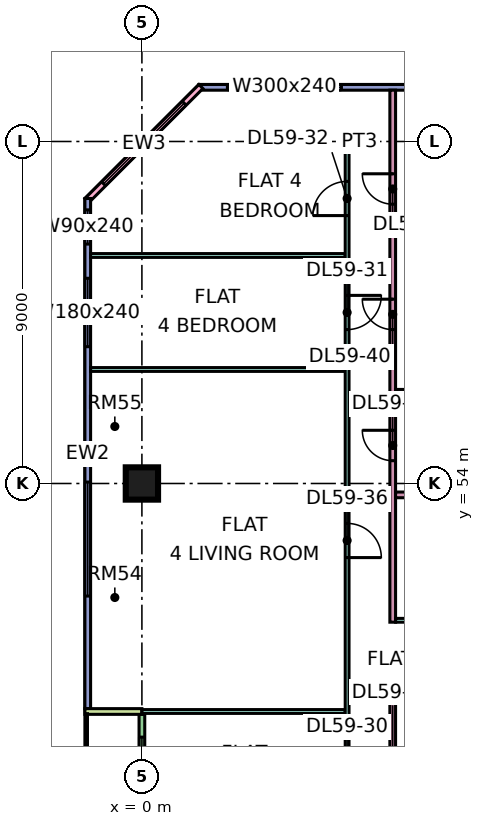
"""IFC4 building model, lengths in metres.
Left out: names, types, materials, properties, quantities, classifications, styles, units other than length and angle.
Written with IfcOpenShell. Run it as: python <this file> out.ifc"""

import sys

from ifc_helpers import new_model, si_unit, direction, frame, frame_2d, origin, origin_2d, place, context, subcontext, project, spatial, rectangle, extrude, element, fill, save


model = new_model("IFC4")
c1 = context("Model", 3, precision=1e-05, world=origin(), true_north=direction((0.0, 1.0)))
c2 = subcontext(c1, "Body", "Model", "MODEL_VIEW")
j1 = project(units=[si_unit("LENGTHUNIT", "METRE"), si_unit("PLANEANGLEUNIT", "RADIAN")], contexts=[c1])
p1 = place(None, origin())
s1 = spatial("IfcSite", under=j1, at=p1, CompositionType="ELEMENT")
p2 = place(p1, origin())
s2 = spatial("IfcBuilding", under=s1, at=p2, CompositionType="ELEMENT")
p3 = place(p2, frame((0.0, 0.0, 249.15)))
s3 = spatial("IfcBuildingStorey", under=s2, at=p3, CompositionType="ELEMENT", Elevation=249.15)
p4 = place(p3, frame((0.0, 54.0, 0.0), z_axis=(0.0, 0.0, 1.0), x_axis=(1.0, 0.0, 0.0)))
e1 = element("IfcColumn", 1, at=p4, inside=s3, PredefinedType="COLUMN", context=c2, shape_type="SweptSolid", body=[
    extrude(rectangle(XDim=0.85, YDim=0.85, at=origin_2d()), origin(), (0.0, 0.0, 1.0), 3.75),
])
p5 = place(p3, frame((11.925, 64.425, 0.0), z_axis=(0.0, 0.0, 1.0), x_axis=(-1.0, 0.0, 0.0)))
e2 = element("IfcWall", 2, at=p5, inside=s3, PredefinedType="SOLIDWALL", context=c2, shape_type="SweptSolid", body=[
    extrude(rectangle(XDim=10.425, YDim=0.15, at=frame_2d((5.212, 0.0))), origin(), (0.0, 0.0, 1.0), 3.35),
])
p6 = place(p5, frame((6.675, 0.0, 0.45)))
e3 = element("IfcOpeningElement", 3, at=p6, cuts=e2, PredefinedType="OPENING", context=c2, shape_type="SweptSolid", body=[
    extrude(rectangle(XDim=3.0, YDim=2.4, at=frame_2d((1.5, 1.2))), frame((0.0, 0.085, 0.0), z_axis=(0.0, -1.0, 0.0), x_axis=(1.0, 0.0, 0.0)), (0.0, 0.0, 1.0), 0.17),
])
p7 = place(p3, frame((1.553, 64.447, 0.0), z_axis=(0.0, 0.0, 1.0), x_axis=(-0.707106781187, -0.707106781187, 0.0)))
e4 = element("IfcWall", 4, at=p7, inside=s3, PredefinedType="SOLIDWALL", context=c2, shape_type="SweptSolid", body=[
    extrude(rectangle(XDim=4.243, YDim=0.15, at=frame_2d((2.121, 0.0))), origin(), (0.0, 0.0, 1.0), 3.35),
])
p8 = place(p7, frame((0.621, 0.0, 0.45)))
e5 = element("IfcOpeningElement", 5, at=p8, cuts=e4, PredefinedType="OPENING", context=c2, shape_type="SweptSolid", body=[
    extrude(rectangle(XDim=3.0, YDim=2.4, at=frame_2d((1.5, 1.2))), frame((0.0, 0.085, 0.0), z_axis=(0.0, -1.0, 0.0), x_axis=(1.0, 0.0, 0.0)), (0.0, 0.0, 1.0), 0.17),
])
p9 = place(p3, frame((-1.425, 61.5, 0.0), z_axis=(0.0, 0.0, 1.0), x_axis=(0.0, -1.0, 0.0)))
e6 = element("IfcWall", 6, at=p9, inside=s3, PredefinedType="SOLIDWALL", context=c2, shape_type="SweptSolid", body=[
    extrude(rectangle(XDim=13.425, YDim=0.15, at=frame_2d((6.712, 0.0))), origin(), (0.0, 0.0, 1.0), 3.35),
])
p10 = place(p9, frame((0.3, 0.0, 0.45)))
e7 = element("IfcOpeningElement", 7, at=p10, cuts=e6, PredefinedType="OPENING", context=c2, shape_type="SweptSolid", body=[
    extrude(rectangle(XDim=0.9, YDim=2.4, at=frame_2d((0.45, 1.2))), frame((0.0, 0.085, 0.0), z_axis=(0.0, -1.0, 0.0), x_axis=(1.0, 0.0, 0.0)), (0.0, 0.0, 1.0), 0.17),
])
p11 = place(p9, frame((2.1, 0.0, 0.45)))
e8 = element("IfcOpeningElement", 8, at=p11, cuts=e6, PredefinedType="OPENING", context=c2, shape_type="SweptSolid", body=[
    extrude(rectangle(XDim=1.8, YDim=2.4, at=frame_2d((0.9, 1.2))), frame((0.0, 0.085, 0.0), z_axis=(0.0, -1.0, 0.0), x_axis=(1.0, 0.0, 0.0)), (0.0, 0.0, 1.0), 0.17),
])
p12 = place(p9, frame((7.462, 0.0, 0.45)))
e9 = element("IfcOpeningElement", 9, at=p12, cuts=e6, PredefinedType="OPENING", context=c2, shape_type="SweptSolid", body=[
    extrude(rectangle(XDim=3.0, YDim=2.4, at=frame_2d((1.5, 1.2))), frame((0.0, 0.085, 0.0), z_axis=(0.0, -1.0, 0.0), x_axis=(1.0, 0.0, 0.0)), (0.0, 0.0, 1.0), 0.17),
])
p13 = place(p3, frame((0.0, 47.925, 0.0), z_axis=(0.0, 0.0, 1.0), x_axis=(0.0, -1.0, 0.0)))
e10 = element("IfcWall", 10, at=p13, inside=s3, PredefinedType="SOLIDWALL", context=c2, shape_type="SweptSolid", body=[
    extrude(rectangle(XDim=11.85, YDim=0.15, at=frame_2d((5.925, 0.0))), origin(), (0.0, 0.0, 1.0), 3.35),
])
p14 = place(p13, frame((0.6, 0.0, 0.45)))
e11 = element("IfcOpeningElement", 11, at=p14, cuts=e10, PredefinedType="OPENING", context=c2, shape_type="SweptSolid", body=[
    extrude(rectangle(XDim=1.2, YDim=2.4, at=frame_2d((0.6, 1.2))), frame((0.0, 0.085, 0.0), z_axis=(0.0, -1.0, 0.0), x_axis=(1.0, 0.0, 0.0)), (0.0, 0.0, 1.0), 0.17),
])
p15 = place(p13, frame((4.087, 0.0, 0.0)))
e12 = element("IfcOpeningElement", 12, at=p15, cuts=e10, PredefinedType="OPENING", context=c2, shape_type="SweptSolid", body=[
    extrude(rectangle(XDim=1.2, YDim=2.4, at=frame_2d((0.6, 1.2))), frame((0.0, 0.085, 0.0), z_axis=(0.0, -1.0, 0.0), x_axis=(1.0, 0.0, 0.0)), (0.0, 0.0, 1.0), 0.17),
])
p16 = place(p13, frame((6.525, 0.0, 0.45)))
e13 = element("IfcOpeningElement", 13, at=p16, cuts=e10, PredefinedType="OPENING", context=c2, shape_type="SweptSolid", body=[
    extrude(rectangle(XDim=1.8, YDim=2.4, at=frame_2d((0.9, 1.2))), frame((0.0, 0.085, 0.0), z_axis=(0.0, -1.0, 0.0), x_axis=(1.0, 0.0, 0.0)), (0.0, 0.0, 1.0), 0.17),
])
p17 = place(p13, frame((9.562, 0.0, 0.45)))
e14 = element("IfcOpeningElement", 14, at=p17, cuts=e10, PredefinedType="OPENING", context=c2, shape_type="SweptSolid", body=[
    extrude(rectangle(XDim=1.2, YDim=2.4, at=frame_2d((0.6, 1.2))), frame((0.0, 0.085, 0.0), z_axis=(0.0, -1.0, 0.0), x_axis=(1.0, 0.0, 0.0)), (0.0, 0.0, 1.0), 0.17),
])
p18 = place(p3, frame((-1.5, 48.0, 0.0), z_axis=(0.0, 0.0, 1.0), x_axis=(1.0, 0.0, 0.0)))
e15 = element("IfcWall", 15, at=p18, inside=s3, PredefinedType="SOLIDWALL", context=c2, shape_type="SweptSolid", body=[
    extrude(rectangle(XDim=1.5, YDim=0.15, at=frame_2d((0.75, 0.0))), origin(), (0.0, 0.0, 1.0), 3.35),
])
p19 = place(p3, frame((-1.351, 60.0, 0.0), z_axis=(0.0, 0.0, 1.0), x_axis=(1.0, 0.0, 0.0)))
e16 = element("IfcWall", 16, at=p19, inside=s3, PredefinedType="PARTITIONING", context=c2, shape_type="SweptSolid", body=[
    extrude(rectangle(XDim=6.701, YDim=0.1, at=frame_2d((3.351, 0.0))), origin(), (0.0, 0.0, 1.0), 3.35),
])
p20 = place(p3, frame((0.0, 48.0, 0.0), z_axis=(0.0, 0.0, 1.0), x_axis=(1.0, 0.0, 0.0)))
e17 = element("IfcWall", 17, at=p20, inside=s3, PredefinedType="PARTITIONING", context=c2, shape_type="SweptSolid", body=[
    extrude(rectangle(XDim=5.35, YDim=0.1, at=frame_2d((2.675, 0.0))), origin(), (0.0, 0.0, 1.0), 3.35),
])
p21 = place(p3, frame((-1.35, 57.0, 0.0), z_axis=(0.0, 0.0, 1.0), x_axis=(1.0, 0.0, 0.0)))
e18 = element("IfcWall", 18, at=p21, inside=s3, PredefinedType="PARTITIONING", context=c2, shape_type="SweptSolid", body=[
    extrude(rectangle(XDim=6.7, YDim=0.1, at=frame_2d((3.35, 0.0))), origin(), (0.0, 0.0, 1.0), 3.35),
])
p22 = place(p3, frame((5.4, 36.1, 0.0), z_axis=(0.0, 0.0, 1.0), x_axis=(0.0, 1.0, 0.0)))
e19 = element("IfcWall", 19, at=p22, inside=s3, PredefinedType="PARTITIONING", context=c2, shape_type="SweptSolid", body=[
    extrude(rectangle(XDim=26.95, YDim=0.1, at=frame_2d((13.475, 0.0))), origin(), (0.0, 0.0, 1.0), 3.35),
])
p23 = place(p22, frame((0.95, 0.0, 0.0)))
e20 = element("IfcOpeningElement", 20, at=p23, cuts=e19, PredefinedType="OPENING", context=c2, shape_type="SweptSolid", body=[
    extrude(rectangle(XDim=0.9, YDim=2.1, at=frame_2d((0.45, 1.05))), frame((0.0, 0.06, 0.0), z_axis=(0.0, -1.0, 0.0), x_axis=(1.0, 0.0, 0.0)), (0.0, 0.0, 1.0), 0.12),
])
p24 = place(p22, frame((3.95, 0.0, 0.0)))
e21 = element("IfcOpeningElement", 21, at=p24, cuts=e19, PredefinedType="OPENING", context=c2, shape_type="SweptSolid", body=[
    extrude(rectangle(XDim=0.9, YDim=2.1, at=frame_2d((0.45, 1.05))), frame((0.0, 0.06, 0.0), z_axis=(0.0, -1.0, 0.0), x_axis=(1.0, 0.0, 0.0)), (0.0, 0.0, 1.0), 0.12),
])
p25 = place(p22, frame((6.95, 0.0, 0.0)))
e22 = element("IfcOpeningElement", 22, at=p25, cuts=e19, PredefinedType="OPENING", context=c2, shape_type="SweptSolid", body=[
    extrude(rectangle(XDim=0.9, YDim=2.1, at=frame_2d((0.45, 1.05))), frame((0.0, 0.06, 0.0), z_axis=(0.0, -1.0, 0.0), x_axis=(1.0, 0.0, 0.0)), (0.0, 0.0, 1.0), 0.12),
])
p26 = place(p22, frame((9.95, 0.0, 0.0)))
e23 = element("IfcOpeningElement", 23, at=p26, cuts=e19, PredefinedType="OPENING", context=c2, shape_type="SweptSolid", body=[
    extrude(rectangle(XDim=0.9, YDim=2.1, at=frame_2d((0.45, 1.05))), frame((0.0, 0.06, 0.0), z_axis=(0.0, -1.0, 0.0), x_axis=(1.0, 0.0, 0.0)), (0.0, 0.0, 1.0), 0.12),
])
p27 = place(p22, frame((21.95, 0.0, 0.0)))
e24 = element("IfcOpeningElement", 24, at=p27, cuts=e19, PredefinedType="OPENING", context=c2, shape_type="SweptSolid", body=[
    extrude(rectangle(XDim=0.9, YDim=2.1, at=frame_2d((0.45, 1.05))), frame((0.0, 0.06, 0.0), z_axis=(0.0, -1.0, 0.0), x_axis=(1.0, 0.0, 0.0)), (0.0, 0.0, 1.0), 0.12),
])
p28 = place(p22, frame((24.95, 0.0, 0.0)))
e25 = element("IfcOpeningElement", 25, at=p28, cuts=e19, PredefinedType="OPENING", context=c2, shape_type="SweptSolid", body=[
    extrude(rectangle(XDim=0.9, YDim=2.1, at=frame_2d((0.45, 1.05))), frame((0.0, 0.06, 0.0), z_axis=(0.0, -1.0, 0.0), x_axis=(1.0, 0.0, 0.0)), (0.0, 0.0, 1.0), 0.12),
])
p29 = place(p22, frame((15.95, 0.0, 0.0)))
e26 = element("IfcOpeningElement", 26, at=p29, cuts=e19, PredefinedType="OPENING", context=c2, shape_type="SweptSolid", body=[
    extrude(rectangle(XDim=0.9, YDim=2.1, at=frame_2d((0.45, 1.05))), frame((0.0, 0.06, 0.0), z_axis=(0.0, -1.0, 0.0), x_axis=(1.0, 0.0, 0.0)), (0.0, 0.0, 1.0), 0.12),
])
p30 = place(p3, frame((5.45, 63.0, 0.0), z_axis=(0.0, 0.0, 1.0), x_axis=(1.0, 0.0, 0.0)))
e27 = element("IfcWall", 27, at=p30, inside=s3, PredefinedType="PARTITIONING", context=c2, shape_type="SweptSolid", body=[
    extrude(rectangle(XDim=0.55, YDim=0.1, at=frame_2d((0.275, 0.0))), origin(), (0.0, 0.0, 1.0), 3.35),
])
p31 = place(p3, frame((6.6, 36.1, 0.0), z_axis=(0.0, 0.0, 1.0), x_axis=(0.0, 1.0, 0.0)))
e28 = element("IfcWall", 28, at=p31, inside=s3, PredefinedType="PARTITIONING", context=c2, shape_type="SweptSolid", body=[
    extrude(rectangle(XDim=12.275, YDim=0.15, at=frame_2d((6.137, 0.0))), origin(), (0.0, 0.0, 1.0), 3.35),
])
p32 = place(p31, frame((6.95, 0.0, 0.0)))
e29 = element("IfcOpeningElement", 29, at=p32, cuts=e28, PredefinedType="OPENING", context=c2, shape_type="SweptSolid", body=[
    extrude(rectangle(XDim=0.8, YDim=2.1, at=frame_2d((0.4, 1.05))), frame((0.0, 0.085, 0.0), z_axis=(0.0, -1.0, 0.0), x_axis=(1.0, 0.0, 0.0)), (0.0, 0.0, 1.0), 0.17),
])
p33 = place(p31, frame((2.75, 0.0, 0.0)))
e30 = element("IfcOpeningElement", 30, at=p33, cuts=e28, PredefinedType="OPENING", context=c2, shape_type="SweptSolid", body=[
    extrude(rectangle(XDim=0.9, YDim=2.1, at=frame_2d((0.45, 1.05))), frame((0.0, 0.085, 0.0), z_axis=(0.0, -1.0, 0.0), x_axis=(1.0, 0.0, 0.0)), (0.0, 0.0, 1.0), 0.17),
])
p34 = place(p31, frame((9.8, 0.0, 0.0)))
e31 = element("IfcOpeningElement", 31, at=p34, cuts=e28, PredefinedType="OPENING", context=c2, shape_type="SweptSolid", body=[
    extrude(rectangle(XDim=0.8, YDim=2.1, at=frame_2d((0.4, 1.05))), frame((0.0, 0.085, 0.0), z_axis=(0.0, -1.0, 0.0), x_axis=(1.0, 0.0, 0.0)), (0.0, 0.0, 1.0), 0.17),
])
p35 = place(p3, frame((6.6, 50.35, 0.0), z_axis=(0.0, 0.0, 1.0), x_axis=(0.0, 1.0, 0.0)))
e32 = element("IfcWall", 32, at=p35, inside=s3, PredefinedType="PARTITIONING", context=c2, shape_type="SweptSolid", body=[
    extrude(rectangle(XDim=14.0, YDim=0.15, at=frame_2d((7.0, 0.0))), origin(), (0.0, 0.0, 1.0), 3.35),
])
p36 = place(p35, frame((11.0, 0.0, 0.0)))
e33 = element("IfcOpeningElement", 33, at=p36, cuts=e32, PredefinedType="OPENING", context=c2, shape_type="SweptSolid", body=[
    extrude(rectangle(XDim=0.8, YDim=2.1, at=frame_2d((0.4, 1.05))), frame((0.0, 0.085, 0.0), z_axis=(0.0, -1.0, 0.0), x_axis=(1.0, 0.0, 0.0)), (0.0, 0.0, 1.0), 0.17),
])
p37 = place(p35, frame((4.25, 0.0, 0.0)))
e34 = element("IfcOpeningElement", 34, at=p37, cuts=e32, PredefinedType="OPENING", context=c2, shape_type="SweptSolid", body=[
    extrude(rectangle(XDim=0.8, YDim=2.1, at=frame_2d((0.4, 1.05))), frame((0.0, 0.085, 0.0), z_axis=(0.0, -1.0, 0.0), x_axis=(1.0, 0.0, 0.0)), (0.0, 0.0, 1.0), 0.17),
])
p38 = place(p35, frame((7.7, 0.0, 0.0)))
e35 = element("IfcOpeningElement", 35, at=p38, cuts=e32, PredefinedType="OPENING", context=c2, shape_type="SweptSolid", body=[
    extrude(rectangle(XDim=0.8, YDim=2.1, at=frame_2d((0.4, 1.05))), frame((0.0, 0.085, 0.0), z_axis=(0.0, -1.0, 0.0), x_axis=(1.0, 0.0, 0.0)), (0.0, 0.0, 1.0), 0.17),
])
p39 = place(p3, frame((6.675, 48.3, 0.0), z_axis=(0.0, 0.0, 1.0), x_axis=(1.0, 0.0, 0.0)))
e36 = element("IfcWall", 36, at=p39, inside=s3, PredefinedType="PARTITIONING", context=c2, shape_type="SweptSolid", body=[
    extrude(rectangle(XDim=2.825, YDim=0.15, at=frame_2d((1.413, 0.0))), origin(), (0.0, 0.0, 1.0), 3.35),
])
p40 = place(p3, frame((6.675, 50.4, 0.0), z_axis=(0.0, 0.0, 1.0), x_axis=(1.0, 0.0, 0.0)))
e37 = element("IfcWall", 37, at=p40, inside=s3, PredefinedType="PARTITIONING", context=c2, shape_type="SweptSolid", body=[
    extrude(rectangle(XDim=2.825, YDim=0.1, at=frame_2d((1.413, 0.0))), origin(), (0.0, 0.0, 1.0), 3.35),
])
p41 = place(p40, frame((0.975, 0.0, 0.0)))
e38 = element("IfcOpeningElement", 38, at=p41, cuts=e37, PredefinedType="OPENING", context=c2, shape_type="SweptSolid", body=[
    extrude(rectangle(XDim=0.9, YDim=2.1, at=frame_2d((0.45, 1.05))), frame((0.0, 0.06, 0.0), z_axis=(0.0, -1.0, 0.0), x_axis=(1.0, 0.0, 0.0)), (0.0, 0.0, 1.0), 0.12),
])
for number, where, z_axis, x_axis in (
    (39, (6.675, 53.7, 0.0), (0.0, 0.0, 1.0), (1.0, 0.0, 0.0)),
    (40, (6.675, 56.4, 0.0), (0.0, 0.0, 1.0), (1.0, 0.0, 0.0)),
    (41, (6.675, 60.6, 0.0), (0.0, 0.0, 1.0), (1.0, 0.0, 0.0)),
):
    element("IfcWall", number, at=place(p3, frame(where, z_axis=z_axis, x_axis=x_axis)), inside=s3, PredefinedType="PARTITIONING", context=c2, shape_type="SweptSolid", body=[
        extrude(rectangle(XDim=2.825, YDim=0.15, at=frame_2d((1.413, 0.0))), origin(), (0.0, 0.0, 1.0), 3.35),
    ])
p42 = place(p6, origin())
e42 = element("IfcWindow", 42, at=p42, inside=s3, PartitioningType="SINGLE_PANEL", PredefinedType="WINDOW", context=c2, shape_type="SweptSolid", body=[
    extrude(rectangle(XDim=3.0, YDim=2.4, at=frame_2d((1.5, 1.2))), frame((0.0, 0.03, 0.0), z_axis=(0.0, -1.0, 0.0), x_axis=(1.0, 0.0, 0.0)), (0.0, 0.0, 1.0), 0.06),
])
fill(e3, e42)
p43 = place(p8, origin())
e43 = element("IfcWindow", 43, at=p43, inside=s3, PartitioningType="SINGLE_PANEL", PredefinedType="WINDOW", context=c2, shape_type="SweptSolid", body=[
    extrude(rectangle(XDim=3.0, YDim=2.4, at=frame_2d((1.5, 1.2))), frame((0.0, 0.03, 0.0), z_axis=(0.0, -1.0, 0.0), x_axis=(1.0, 0.0, 0.0)), (0.0, 0.0, 1.0), 0.06),
])
fill(e5, e43)
p44 = place(p10, origin())
e44 = element("IfcWindow", 44, at=p44, inside=s3, PartitioningType="SINGLE_PANEL", PredefinedType="WINDOW", context=c2, shape_type="SweptSolid", body=[
    extrude(rectangle(XDim=0.9, YDim=2.4, at=frame_2d((0.45, 1.2))), frame((0.0, 0.03, 0.0), z_axis=(0.0, -1.0, 0.0), x_axis=(1.0, 0.0, 0.0)), (0.0, 0.0, 1.0), 0.06),
])
fill(e7, e44)
p45 = place(p11, origin())
e45 = element("IfcWindow", 45, at=p45, inside=s3, PartitioningType="SINGLE_PANEL", PredefinedType="WINDOW", context=c2, shape_type="SweptSolid", body=[
    extrude(rectangle(XDim=1.8, YDim=2.4, at=frame_2d((0.9, 1.2))), frame((0.0, 0.03, 0.0), z_axis=(0.0, -1.0, 0.0), x_axis=(1.0, 0.0, 0.0)), (0.0, 0.0, 1.0), 0.06),
])
fill(e8, e45)
p46 = place(p12, origin())
e46 = element("IfcWindow", 46, at=p46, inside=s3, PartitioningType="SINGLE_PANEL", PredefinedType="WINDOW", context=c2, shape_type="SweptSolid", body=[
    extrude(rectangle(XDim=3.0, YDim=2.4, at=frame_2d((1.5, 1.2))), frame((0.0, 0.03, 0.0), z_axis=(0.0, -1.0, 0.0), x_axis=(1.0, 0.0, 0.0)), (0.0, 0.0, 1.0), 0.06),
])
fill(e9, e46)
p47 = place(p14, origin())
e47 = element("IfcWindow", 47, at=p47, inside=s3, PartitioningType="SINGLE_PANEL", PredefinedType="WINDOW", context=c2, shape_type="SweptSolid", body=[
    extrude(rectangle(XDim=1.2, YDim=2.4, at=frame_2d((0.6, 1.2))), frame((0.0, 0.03, 0.0), z_axis=(0.0, -1.0, 0.0), x_axis=(1.0, 0.0, 0.0)), (0.0, 0.0, 1.0), 0.06),
])
fill(e11, e47)
p48 = place(p27, origin())
e48 = element("IfcDoor", 48, at=p48, inside=s3, OperationType="SINGLE_SWING_RIGHT", PredefinedType="DOOR", context=c2, shape_type="SweptSolid", body=[
    extrude(rectangle(XDim=0.9, YDim=2.1, at=frame_2d((0.45, 1.05))), frame((0.0, 0.025, 0.0), z_axis=(0.0, -1.0, 0.0), x_axis=(1.0, 0.0, 0.0)), (0.0, 0.0, 1.0), 0.05),
])
fill(e24, e48)
p49 = place(p28, origin())
e49 = element("IfcDoor", 49, at=p49, inside=s3, OperationType="SINGLE_SWING_LEFT", PredefinedType="DOOR", context=c2, shape_type="SweptSolid", body=[
    extrude(rectangle(XDim=0.9, YDim=2.1, at=frame_2d((0.45, 1.05))), frame((0.0, 0.025, 0.0), z_axis=(0.0, -1.0, 0.0), x_axis=(1.0, 0.0, 0.0)), (0.0, 0.0, 1.0), 0.05),
])
fill(e25, e49)
p50 = place(p36, frame((0.8, 0.0, 0.0), z_axis=(0.0, 0.0, 1.0), x_axis=(-1.0, 0.0, 0.0)))
e50 = element("IfcDoor", 50, at=p50, inside=s3, OperationType="SINGLE_SWING_RIGHT", PredefinedType="DOOR", context=c2, shape_type="SweptSolid", body=[
    extrude(rectangle(XDim=0.8, YDim=2.1, at=frame_2d((0.4, 1.05))), frame((0.0, 0.025, 0.0), z_axis=(0.0, -1.0, 0.0), x_axis=(1.0, 0.0, 0.0)), (0.0, 0.0, 1.0), 0.05),
])
fill(e33, e50)
p51 = place(p29, frame((0.9, 0.0, 0.0), z_axis=(0.0, 0.0, 1.0), x_axis=(-1.0, 0.0, 0.0)))
e51 = element("IfcDoor", 51, at=p51, inside=s3, OperationType="SINGLE_SWING_LEFT", PredefinedType="DOOR", context=c2, shape_type="SweptSolid", body=[
    extrude(rectangle(XDim=0.9, YDim=2.1, at=frame_2d((0.45, 1.05))), frame((0.0, 0.025, 0.0), z_axis=(0.0, -1.0, 0.0), x_axis=(1.0, 0.0, 0.0)), (0.0, 0.0, 1.0), 0.05),
])
fill(e26, e51)
p52 = place(p37, frame((0.8, 0.0, 0.0), z_axis=(0.0, 0.0, 1.0), x_axis=(-1.0, 0.0, 0.0)))
e52 = element("IfcDoor", 52, at=p52, inside=s3, OperationType="SINGLE_SWING_RIGHT", PredefinedType="DOOR", context=c2, shape_type="SweptSolid", body=[
    extrude(rectangle(XDim=0.8, YDim=2.1, at=frame_2d((0.4, 1.05))), frame((0.0, 0.025, 0.0), z_axis=(0.0, -1.0, 0.0), x_axis=(1.0, 0.0, 0.0)), (0.0, 0.0, 1.0), 0.05),
])
fill(e34, e52)
p53 = place(p38, frame((0.8, 0.0, 0.0), z_axis=(0.0, 0.0, 1.0), x_axis=(-1.0, 0.0, 0.0)))
e53 = element("IfcDoor", 53, at=p53, inside=s3, OperationType="SINGLE_SWING_RIGHT", PredefinedType="DOOR", context=c2, shape_type="SweptSolid", body=[
    extrude(rectangle(XDim=0.8, YDim=2.1, at=frame_2d((0.4, 1.05))), frame((0.0, 0.025, 0.0), z_axis=(0.0, -1.0, 0.0), x_axis=(1.0, 0.0, 0.0)), (0.0, 0.0, 1.0), 0.05),
])
fill(e35, e53)
save(model, sys.argv[1])
